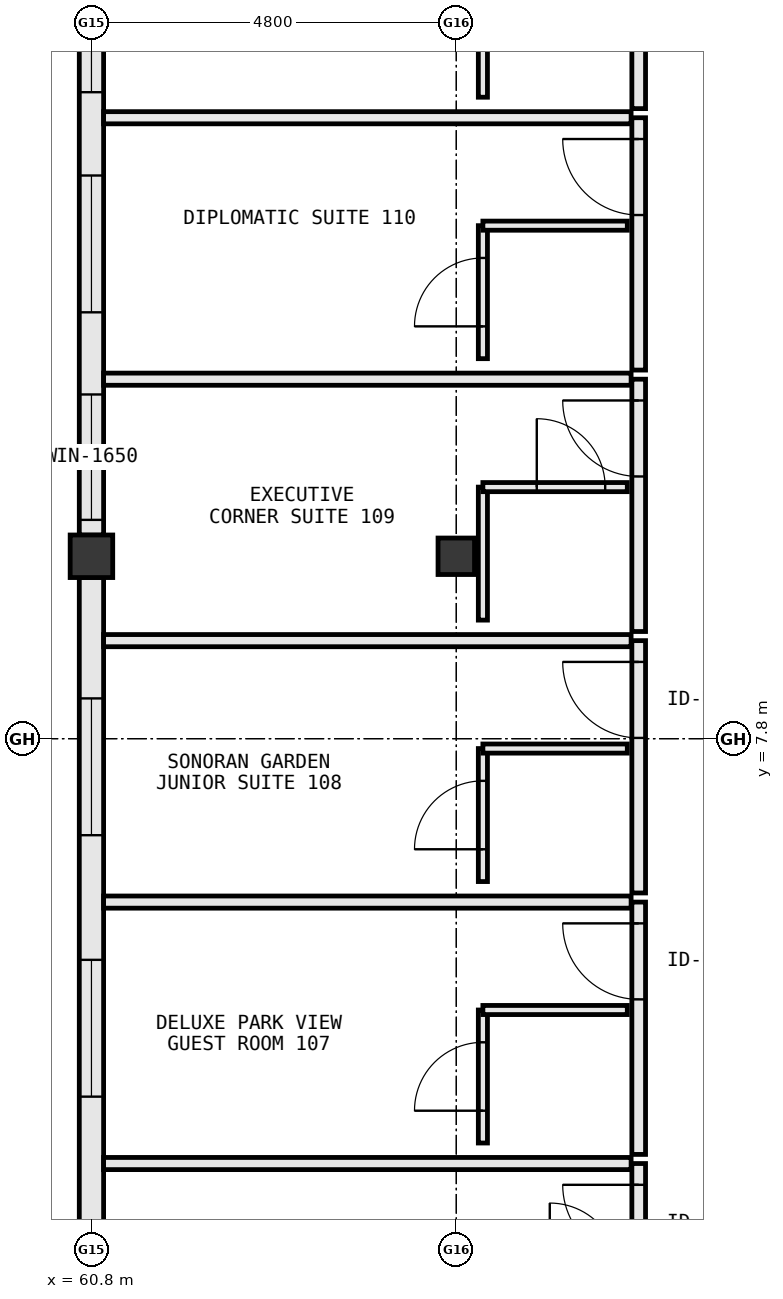
"""IFC4 building model, lengths in metres.
Left out: names, types, materials, properties, quantities, classifications, styles, units other than length and angle.
Written with IfcOpenShell. Run it as: python <this file> out.ifc"""

import sys

from ifc_helpers import new_model, si_unit, direction, frame, frame_2d, origin, origin_2d, place, context, subcontext, project, spatial, rectangle, extrude, element, fill, save


model = new_model("IFC4")
c1 = context("Model", 3, precision=1e-05, world=origin(), true_north=direction((0.0, 1.0)))
c2 = subcontext(c1, "Body", "Model", "MODEL_VIEW")
j1 = project(units=[si_unit("LENGTHUNIT", "METRE"), si_unit("PLANEANGLEUNIT", "RADIAN")], contexts=[c1])
p1 = place(None, origin())
s1 = spatial("IfcSite", under=j1, at=p1, CompositionType="ELEMENT")
p2 = place(p1, origin())
s2 = spatial("IfcBuilding", under=s1, at=p2, CompositionType="ELEMENT")
p3 = place(p2, frame((0.0, 0.0, 20.0)))
s3 = spatial("IfcBuildingStorey", under=s2, at=p3, CompositionType="ELEMENT", Elevation=20.0)
p4 = place(p3, frame((60.8, 10.2, 0.0), z_axis=(0.0, 0.0, 1.0), x_axis=(1.0, 0.0, 0.0)))
e1 = element("IfcColumn", 1, at=p4, inside=s3, PredefinedType="COLUMN", context=c2, shape_type="SweptSolid", body=[
    extrude(rectangle(XDim=0.56, YDim=0.56, at=origin_2d()), origin(), (0.0, 0.0, 1.0), 3.8),
])
p5 = place(p3, frame((65.6, 10.2, 0.0), z_axis=(0.0, 0.0, 1.0), x_axis=(1.0, 0.0, 0.0)))
e2 = element("IfcColumn", 2, at=p5, inside=s3, PredefinedType="COLUMN", context=c2, shape_type="SweptSolid", body=[
    extrude(rectangle(XDim=0.48, YDim=0.48, at=origin_2d()), origin(), (0.0, 0.0, 1.0), 3.8),
])
p6 = place(p3, frame((60.8, 18.322, 0.0), z_axis=(0.0, 0.0, 1.0), x_axis=(0.0, -1.0, 0.0)))
e3 = element("IfcWall", 3, at=p6, inside=s3, PredefinedType="STANDARD", context=c2, shape_type="SweptSolid", body=[
    extrude(rectangle(XDim=7.844, YDim=0.32, at=frame_2d((3.922, 0.0))), origin(), (0.0, 0.0, 1.0), 3.005),
])
p7 = place(p6, frame((5.993, 0.0, 0.85)))
e4 = element("IfcOpeningElement", 4, at=p7, cuts=e3, PredefinedType="OPENING", context=c2, shape_type="SweptSolid", body=[
    extrude(rectangle(XDim=1.65, YDim=1.8, at=frame_2d((0.825, 0.9))), frame((0.0, 0.172, 0.0), z_axis=(0.0, -1.0, 0.0), x_axis=(1.0, 0.0, 0.0)), (0.0, 0.0, 1.0), 0.344),
])
p8 = place(p6, frame((3.112, 0.0, 0.85)))
e5 = element("IfcOpeningElement", 5, at=p8, cuts=e3, PredefinedType="OPENING", context=c2, shape_type="SweptSolid", body=[
    extrude(rectangle(XDim=1.8, YDim=1.85, at=frame_2d((0.9, 0.925))), frame((0.0, 0.172, 0.0), z_axis=(0.0, -1.0, 0.0), x_axis=(1.0, 0.0, 0.0)), (0.0, 0.0, 1.0), 0.344),
])
p9 = place(p6, frame((0.216, 0.0, 0.85)))
e6 = element("IfcOpeningElement", 6, at=p9, cuts=e3, PredefinedType="OPENING", context=c2, shape_type="SweptSolid", body=[
    extrude(rectangle(XDim=1.8, YDim=1.85, at=frame_2d((0.9, 0.925))), frame((0.0, 0.172, 0.0), z_axis=(0.0, -1.0, 0.0), x_axis=(1.0, 0.0, 0.0)), (0.0, 0.0, 1.0), 0.344),
])
p10 = place(p3, frame((60.8, 9.922, 0.0), z_axis=(0.0, 0.0, 1.0), x_axis=(0.0, -1.0, 0.0)))
e7 = element("IfcWall", 7, at=p10, inside=s3, PredefinedType="STANDARD", context=c2, shape_type="SweptSolid", body=[
    extrude(rectangle(XDim=9.044, YDim=0.32, at=frame_2d((4.522, 0.0))), origin(), (0.0, 0.0, 1.0), 2.905),
])
p11 = place(p10, frame((5.032, 0.0, 0.85)))
e8 = element("IfcOpeningElement", 8, at=p11, cuts=e7, PredefinedType="OPENING", context=c2, shape_type="SweptSolid", body=[
    extrude(rectangle(XDim=1.8, YDim=1.85, at=frame_2d((0.9, 0.925))), frame((0.0, 0.172, 0.0), z_axis=(0.0, -1.0, 0.0), x_axis=(1.0, 0.0, 0.0)), (0.0, 0.0, 1.0), 0.344),
])
p12 = place(p10, frame((1.592, 0.0, 0.85)))
e9 = element("IfcOpeningElement", 9, at=p12, cuts=e7, PredefinedType="OPENING", context=c2, shape_type="SweptSolid", body=[
    extrude(rectangle(XDim=1.8, YDim=1.85, at=frame_2d((0.9, 0.925))), frame((0.0, 0.172, 0.0), z_axis=(0.0, -1.0, 0.0), x_axis=(1.0, 0.0, 0.0)), (0.0, 0.0, 1.0), 0.344),
])
p13 = place(p3, frame((68.0, -1.11, 0.0), z_axis=(0.0, 0.0, 1.0), x_axis=(0.0, 1.0, 0.0)))
e10 = element("IfcWall", 10, at=p13, inside=s3, PredefinedType="PARTITIONING", context=c2, shape_type="SweptSolid", body=[
    extrude(rectangle(XDim=3.32, YDim=0.18, at=frame_2d((1.66, 0.0))), origin(), (0.0, 0.0, 1.0), 3.55),
])
p14 = place(p13, frame((2.04, 0.0, 0.0)))
e11 = element("IfcOpeningElement", 11, at=p14, cuts=e10, PredefinedType="OPENING", context=c2, shape_type="SweptSolid", body=[
    extrude(rectangle(XDim=1.0, YDim=2.2, at=frame_2d((0.5, 1.1))), frame((0.0, 0.102, 0.0), z_axis=(0.0, -1.0, 0.0), x_axis=(1.0, 0.0, 0.0)), (0.0, 0.0, 1.0), 0.204),
])
p15 = place(p3, frame((60.96, 2.21, 0.0), z_axis=(0.0, 0.0, 1.0), x_axis=(1.0, 0.0, 0.0)))
e12 = element("IfcWall", 12, at=p15, inside=s3, PredefinedType="PARTITIONING", context=c2, shape_type="SweptSolid", body=[
    extrude(rectangle(XDim=6.94, YDim=0.16, at=frame_2d((3.47, 0.0))), origin(), (0.0, 0.0, 1.0), 3.55),
])
p16 = place(p3, frame((68.0, 2.33, 0.0), z_axis=(0.0, 0.0, 1.0), x_axis=(0.0, 1.0, 0.0)))
e13 = element("IfcWall", 13, at=p16, inside=s3, PredefinedType="PARTITIONING", context=c2, shape_type="SweptSolid", body=[
    extrude(rectangle(XDim=3.32, YDim=0.18, at=frame_2d((1.66, 0.0))), origin(), (0.0, 0.0, 1.0), 3.55),
])
p17 = place(p16, frame((2.04, 0.0, 0.0)))
e14 = element("IfcOpeningElement", 14, at=p17, cuts=e13, PredefinedType="OPENING", context=c2, shape_type="SweptSolid", body=[
    extrude(rectangle(XDim=1.0, YDim=2.2, at=frame_2d((0.5, 1.1))), frame((0.0, 0.102, 0.0), z_axis=(0.0, -1.0, 0.0), x_axis=(1.0, 0.0, 0.0)), (0.0, 0.0, 1.0), 0.204),
])
p18 = place(p3, frame((60.96, 5.65, 0.0), z_axis=(0.0, 0.0, 1.0), x_axis=(1.0, 0.0, 0.0)))
e15 = element("IfcWall", 15, at=p18, inside=s3, PredefinedType="PARTITIONING", context=c2, shape_type="SweptSolid", body=[
    extrude(rectangle(XDim=6.94, YDim=0.16, at=frame_2d((3.47, 0.0))), origin(), (0.0, 0.0, 1.0), 3.55),
])
p19 = place(p3, frame((65.95, 2.48, 0.0), z_axis=(0.0, 0.0, 1.0), x_axis=(0.0, 1.0, 0.0)))
e16 = element("IfcWall", 16, at=p19, inside=s3, PredefinedType="PARTITIONING", context=c2, shape_type="SweptSolid", body=[
    extrude(rectangle(XDim=1.75, YDim=0.12, at=frame_2d((0.875, 0.0))), origin(), (0.0, 0.0, 1.0), 2.905),
])
p20 = place(p19, frame((0.425, 0.0, 0.0)))
e17 = element("IfcOpeningElement", 17, at=p20, cuts=e16, PredefinedType="OPENING", context=c2, shape_type="SweptSolid", body=[
    extrude(rectangle(XDim=0.9, YDim=2.15, at=frame_2d((0.45, 1.075))), frame((0.0, 0.072, 0.0), z_axis=(0.0, -1.0, 0.0), x_axis=(1.0, 0.0, 0.0)), (0.0, 0.0, 1.0), 0.144),
])
p21 = place(p3, frame((65.95, 4.23, 0.0), z_axis=(0.0, 0.0, 1.0), x_axis=(1.0, 0.0, 0.0)))
e18 = element("IfcWall", 18, at=p21, inside=s3, PredefinedType="PARTITIONING", context=c2, shape_type="SweptSolid", body=[
    extrude(rectangle(XDim=1.9, YDim=0.12, at=frame_2d((0.95, 0.0))), origin(), (0.0, 0.0, 1.0), 3.55),
])
p22 = place(p3, frame((68.0, 5.77, 0.0), z_axis=(0.0, 0.0, 1.0), x_axis=(0.0, 1.0, 0.0)))
e19 = element("IfcWall", 19, at=p22, inside=s3, PredefinedType="PARTITIONING", context=c2, shape_type="SweptSolid", body=[
    extrude(rectangle(XDim=3.32, YDim=0.18, at=frame_2d((1.66, 0.0))), origin(), (0.0, 0.0, 1.0), 3.55),
])
p23 = place(p22, frame((2.04, 0.0, 0.0)))
e20 = element("IfcOpeningElement", 20, at=p23, cuts=e19, PredefinedType="OPENING", context=c2, shape_type="SweptSolid", body=[
    extrude(rectangle(XDim=1.0, YDim=2.2, at=frame_2d((0.5, 1.1))), frame((0.0, 0.102, 0.0), z_axis=(0.0, -1.0, 0.0), x_axis=(1.0, 0.0, 0.0)), (0.0, 0.0, 1.0), 0.204),
])
p24 = place(p3, frame((60.96, 9.09, 0.0), z_axis=(0.0, 0.0, 1.0), x_axis=(1.0, 0.0, 0.0)))
e21 = element("IfcWall", 21, at=p24, inside=s3, PredefinedType="PARTITIONING", context=c2, shape_type="SweptSolid", body=[
    extrude(rectangle(XDim=6.94, YDim=0.16, at=frame_2d((3.47, 0.0))), origin(), (0.0, 0.0, 1.0), 3.55),
])
p25 = place(p3, frame((65.95, 5.92, 0.0), z_axis=(0.0, 0.0, 1.0), x_axis=(0.0, 1.0, 0.0)))
e22 = element("IfcWall", 22, at=p25, inside=s3, PredefinedType="PARTITIONING", context=c2, shape_type="SweptSolid", body=[
    extrude(rectangle(XDim=1.75, YDim=0.12, at=frame_2d((0.875, 0.0))), origin(), (0.0, 0.0, 1.0), 2.905),
])
p26 = place(p25, frame((0.425, 0.0, 0.0)))
e23 = element("IfcOpeningElement", 23, at=p26, cuts=e22, PredefinedType="OPENING", context=c2, shape_type="SweptSolid", body=[
    extrude(rectangle(XDim=0.9, YDim=2.15, at=frame_2d((0.45, 1.075))), frame((0.0, 0.072, 0.0), z_axis=(0.0, -1.0, 0.0), x_axis=(1.0, 0.0, 0.0)), (0.0, 0.0, 1.0), 0.144),
])
p27 = place(p3, frame((65.95, 7.67, 0.0), z_axis=(0.0, 0.0, 1.0), x_axis=(1.0, 0.0, 0.0)))
e24 = element("IfcWall", 24, at=p27, inside=s3, PredefinedType="PARTITIONING", context=c2, shape_type="SweptSolid", body=[
    extrude(rectangle(XDim=1.9, YDim=0.12, at=frame_2d((0.95, 0.0))), origin(), (0.0, 0.0, 1.0), 3.55),
])
p28 = place(p3, frame((68.0, 9.21, 0.0), z_axis=(0.0, 0.0, 1.0), x_axis=(0.0, 1.0, 0.0)))
e25 = element("IfcWall", 25, at=p28, inside=s3, PredefinedType="PARTITIONING", context=c2, shape_type="SweptSolid", body=[
    extrude(rectangle(XDim=3.32, YDim=0.18, at=frame_2d((1.66, 0.0))), origin(), (0.0, 0.0, 1.0), 3.55),
])
p29 = place(p28, frame((2.04, 0.0, 0.0)))
e26 = element("IfcOpeningElement", 26, at=p29, cuts=e25, PredefinedType="OPENING", context=c2, shape_type="SweptSolid", body=[
    extrude(rectangle(XDim=1.0, YDim=2.2, at=frame_2d((0.5, 1.1))), frame((0.0, 0.102, 0.0), z_axis=(0.0, -1.0, 0.0), x_axis=(1.0, 0.0, 0.0)), (0.0, 0.0, 1.0), 0.204),
])
p30 = place(p3, frame((60.96, 12.53, 0.0), z_axis=(0.0, 0.0, 1.0), x_axis=(1.0, 0.0, 0.0)))
e27 = element("IfcWall", 27, at=p30, inside=s3, PredefinedType="PARTITIONING", context=c2, shape_type="SweptSolid", body=[
    extrude(rectangle(XDim=6.94, YDim=0.16, at=frame_2d((3.47, 0.0))), origin(), (0.0, 0.0, 1.0), 3.55),
])
p31 = place(p3, frame((65.95, 9.36, 0.0), z_axis=(0.0, 0.0, 1.0), x_axis=(0.0, 1.0, 0.0)))
e28 = element("IfcWall", 28, at=p31, inside=s3, PredefinedType="PARTITIONING", context=c2, shape_type="SweptSolid", body=[
    extrude(rectangle(XDim=1.75, YDim=0.12, at=frame_2d((0.875, 0.0))), origin(), (0.0, 0.0, 1.0), 2.905),
])
p32 = place(p3, frame((65.95, 11.11, 0.0), z_axis=(0.0, 0.0, 1.0), x_axis=(1.0, 0.0, 0.0)))
e29 = element("IfcWall", 29, at=p32, inside=s3, PredefinedType="PARTITIONING", context=c2, shape_type="SweptSolid", body=[
    extrude(rectangle(XDim=1.9, YDim=0.12, at=frame_2d((0.95, 0.0))), origin(), (0.0, 0.0, 1.0), 3.55),
])
p33 = place(p32, frame((0.709, 0.0, 0.0)))
e30 = element("IfcOpeningElement", 30, at=p33, cuts=e29, PredefinedType="OPENING", context=c2, shape_type="SweptSolid", body=[
    extrude(rectangle(XDim=0.9, YDim=2.15, at=frame_2d((0.45, 1.075))), frame((0.0, 0.072, 0.0), z_axis=(0.0, -1.0, 0.0), x_axis=(1.0, 0.0, 0.0)), (0.0, 0.0, 1.0), 0.144),
])
p34 = place(p3, frame((68.0, 12.65, 0.0), z_axis=(0.0, 0.0, 1.0), x_axis=(0.0, 1.0, 0.0)))
e31 = element("IfcWall", 31, at=p34, inside=s3, PredefinedType="PARTITIONING", context=c2, shape_type="SweptSolid", body=[
    extrude(rectangle(XDim=3.32, YDim=0.18, at=frame_2d((1.66, 0.0))), origin(), (0.0, 0.0, 1.0), 3.55),
])
p35 = place(p34, frame((2.04, 0.0, 0.0)))
e32 = element("IfcOpeningElement", 32, at=p35, cuts=e31, PredefinedType="OPENING", context=c2, shape_type="SweptSolid", body=[
    extrude(rectangle(XDim=1.0, YDim=2.2, at=frame_2d((0.5, 1.1))), frame((0.0, 0.102, 0.0), z_axis=(0.0, -1.0, 0.0), x_axis=(1.0, 0.0, 0.0)), (0.0, 0.0, 1.0), 0.204),
])
p36 = place(p3, frame((60.96, 15.97, 0.0), z_axis=(0.0, 0.0, 1.0), x_axis=(1.0, 0.0, 0.0)))
e33 = element("IfcWall", 33, at=p36, inside=s3, PredefinedType="PARTITIONING", context=c2, shape_type="SweptSolid", body=[
    extrude(rectangle(XDim=6.94, YDim=0.16, at=frame_2d((3.47, 0.0))), origin(), (0.0, 0.0, 1.0), 3.55),
])
p37 = place(p3, frame((65.95, 12.8, 0.0), z_axis=(0.0, 0.0, 1.0), x_axis=(0.0, 1.0, 0.0)))
e34 = element("IfcWall", 34, at=p37, inside=s3, PredefinedType="PARTITIONING", context=c2, shape_type="SweptSolid", body=[
    extrude(rectangle(XDim=1.75, YDim=0.12, at=frame_2d((0.875, 0.0))), origin(), (0.0, 0.0, 1.0), 3.005),
])
p38 = place(p37, frame((0.425, 0.0, 0.0)))
e35 = element("IfcOpeningElement", 35, at=p38, cuts=e34, PredefinedType="OPENING", context=c2, shape_type="SweptSolid", body=[
    extrude(rectangle(XDim=0.9, YDim=2.15, at=frame_2d((0.45, 1.075))), frame((0.0, 0.072, 0.0), z_axis=(0.0, -1.0, 0.0), x_axis=(1.0, 0.0, 0.0)), (0.0, 0.0, 1.0), 0.144),
])
p39 = place(p3, frame((65.95, 14.55, 0.0), z_axis=(0.0, 0.0, 1.0), x_axis=(1.0, 0.0, 0.0)))
e36 = element("IfcWall", 36, at=p39, inside=s3, PredefinedType="PARTITIONING", context=c2, shape_type="SweptSolid", body=[
    extrude(rectangle(XDim=1.9, YDim=0.12, at=frame_2d((0.95, 0.0))), origin(), (0.0, 0.0, 1.0), 3.55),
])
p40 = place(p3, frame((68.0, 16.09, 0.0), z_axis=(0.0, 0.0, 1.0), x_axis=(0.0, 1.0, 0.0)))
e37 = element("IfcWall", 37, at=p40, inside=s3, PredefinedType="PARTITIONING", context=c2, shape_type="SweptSolid", body=[
    extrude(rectangle(XDim=3.32, YDim=0.18, at=frame_2d((1.66, 0.0))), origin(), (0.0, 0.0, 1.0), 3.55),
])
p41 = place(p40, frame((2.04, 0.0, 0.0)))
e38 = element("IfcOpeningElement", 38, at=p41, cuts=e37, PredefinedType="OPENING", context=c2, shape_type="SweptSolid", body=[
    extrude(rectangle(XDim=1.0, YDim=2.2, at=frame_2d((0.5, 1.1))), frame((0.0, 0.102, 0.0), z_axis=(0.0, -1.0, 0.0), x_axis=(1.0, 0.0, 0.0)), (0.0, 0.0, 1.0), 0.204),
])
p42 = place(p3, frame((65.95, 16.24, 0.0), z_axis=(0.0, 0.0, 1.0), x_axis=(0.0, 1.0, 0.0)))
e39 = element("IfcWall", 39, at=p42, inside=s3, PredefinedType="PARTITIONING", context=c2, shape_type="SweptSolid", body=[
    extrude(rectangle(XDim=1.75, YDim=0.12, at=frame_2d((0.875, 0.0))), origin(), (0.0, 0.0, 1.0), 3.005),
])
p43 = place(p11, origin())
e40 = element("IfcWindow", 40, at=p43, inside=s3, PartitioningType="SINGLE_PANEL", PredefinedType="WINDOW", context=c2, shape_type="SweptSolid", body=[
    extrude(rectangle(XDim=1.8, YDim=1.85, at=frame_2d((0.9, 0.925))), frame((0.0, 0.03, 0.0), z_axis=(0.0, -1.0, 0.0), x_axis=(1.0, 0.0, 0.0)), (0.0, 0.0, 1.0), 0.06),
])
fill(e8, e40)
p44 = place(p12, origin())
e41 = element("IfcWindow", 41, at=p44, inside=s3, PartitioningType="SINGLE_PANEL", PredefinedType="WINDOW", context=c2, shape_type="SweptSolid", body=[
    extrude(rectangle(XDim=1.8, YDim=1.85, at=frame_2d((0.9, 0.925))), frame((0.0, 0.03, 0.0), z_axis=(0.0, -1.0, 0.0), x_axis=(1.0, 0.0, 0.0)), (0.0, 0.0, 1.0), 0.06),
])
fill(e9, e41)
p45 = place(p7, origin())
e42 = element("IfcWindow", 42, at=p45, inside=s3, PartitioningType="SINGLE_PANEL", PredefinedType="WINDOW", context=c2, shape_type="SweptSolid", body=[
    extrude(rectangle(XDim=1.65, YDim=1.8, at=frame_2d((0.825, 0.9))), frame((0.0, 0.03, 0.0), z_axis=(0.0, -1.0, 0.0), x_axis=(1.0, 0.0, 0.0)), (0.0, 0.0, 1.0), 0.06),
])
fill(e4, e42)
p46 = place(p8, origin())
e43 = element("IfcWindow", 43, at=p46, inside=s3, PartitioningType="SINGLE_PANEL", PredefinedType="WINDOW", context=c2, shape_type="SweptSolid", body=[
    extrude(rectangle(XDim=1.8, YDim=1.85, at=frame_2d((0.9, 0.925))), frame((0.0, 0.03, 0.0), z_axis=(0.0, -1.0, 0.0), x_axis=(1.0, 0.0, 0.0)), (0.0, 0.0, 1.0), 0.06),
])
fill(e5, e43)
p47 = place(p9, origin())
e44 = element("IfcWindow", 44, at=p47, inside=s3, PartitioningType="SINGLE_PANEL", PredefinedType="WINDOW", context=c2, shape_type="SweptSolid", body=[
    extrude(rectangle(XDim=1.8, YDim=1.85, at=frame_2d((0.9, 0.925))), frame((0.0, 0.03, 0.0), z_axis=(0.0, -1.0, 0.0), x_axis=(1.0, 0.0, 0.0)), (0.0, 0.0, 1.0), 0.06),
])
fill(e6, e44)
p48 = place(p14, origin())
e45 = element("IfcDoor", 45, at=p48, inside=s3, OperationType="SINGLE_SWING_RIGHT", PredefinedType="DOOR", context=c2, shape_type="SweptSolid", body=[
    extrude(rectangle(XDim=1.0, YDim=2.2, at=frame_2d((0.5, 1.1))), frame((0.0, 0.025, 0.0), z_axis=(0.0, -1.0, 0.0), x_axis=(1.0, 0.0, 0.0)), (0.0, 0.0, 1.0), 0.05),
])
fill(e11, e45)
p49 = place(p17, origin())
e46 = element("IfcDoor", 46, at=p49, inside=s3, OperationType="SINGLE_SWING_RIGHT", PredefinedType="DOOR", context=c2, shape_type="SweptSolid", body=[
    extrude(rectangle(XDim=1.0, YDim=2.2, at=frame_2d((0.5, 1.1))), frame((0.0, 0.025, 0.0), z_axis=(0.0, -1.0, 0.0), x_axis=(1.0, 0.0, 0.0)), (0.0, 0.0, 1.0), 0.05),
])
fill(e14, e46)
p50 = place(p20, origin())
e47 = element("IfcDoor", 47, at=p50, inside=s3, OperationType="SINGLE_SWING_LEFT", PredefinedType="DOOR", context=c2, shape_type="SweptSolid", body=[
    extrude(rectangle(XDim=0.9, YDim=2.15, at=frame_2d((0.45, 1.075))), frame((0.0, 0.025, 0.0), z_axis=(0.0, -1.0, 0.0), x_axis=(1.0, 0.0, 0.0)), (0.0, 0.0, 1.0), 0.05),
])
fill(e17, e47)
p51 = place(p23, origin())
e48 = element("IfcDoor", 48, at=p51, inside=s3, OperationType="SINGLE_SWING_RIGHT", PredefinedType="DOOR", context=c2, shape_type="SweptSolid", body=[
    extrude(rectangle(XDim=1.0, YDim=2.2, at=frame_2d((0.5, 1.1))), frame((0.0, 0.025, 0.0), z_axis=(0.0, -1.0, 0.0), x_axis=(1.0, 0.0, 0.0)), (0.0, 0.0, 1.0), 0.05),
])
fill(e20, e48)
p52 = place(p26, origin())
e49 = element("IfcDoor", 49, at=p52, inside=s3, OperationType="SINGLE_SWING_LEFT", PredefinedType="DOOR", context=c2, shape_type="SweptSolid", body=[
    extrude(rectangle(XDim=0.9, YDim=2.15, at=frame_2d((0.45, 1.075))), frame((0.0, 0.025, 0.0), z_axis=(0.0, -1.0, 0.0), x_axis=(1.0, 0.0, 0.0)), (0.0, 0.0, 1.0), 0.05),
])
fill(e23, e49)
p53 = place(p29, origin())
e50 = element("IfcDoor", 50, at=p53, inside=s3, OperationType="SINGLE_SWING_RIGHT", PredefinedType="DOOR", context=c2, shape_type="SweptSolid", body=[
    extrude(rectangle(XDim=1.0, YDim=2.2, at=frame_2d((0.5, 1.1))), frame((0.0, 0.025, 0.0), z_axis=(0.0, -1.0, 0.0), x_axis=(1.0, 0.0, 0.0)), (0.0, 0.0, 1.0), 0.05),
])
fill(e26, e50)
p54 = place(p33, origin())
e51 = element("IfcDoor", 51, at=p54, inside=s3, OperationType="SINGLE_SWING_LEFT", PredefinedType="DOOR", context=c2, shape_type="SweptSolid", body=[
    extrude(rectangle(XDim=0.9, YDim=2.15, at=frame_2d((0.45, 1.075))), frame((0.0, 0.025, 0.0), z_axis=(0.0, -1.0, 0.0), x_axis=(1.0, 0.0, 0.0)), (0.0, 0.0, 1.0), 0.05),
])
fill(e30, e51)
p55 = place(p35, origin())
e52 = element("IfcDoor", 52, at=p55, inside=s3, OperationType="SINGLE_SWING_RIGHT", PredefinedType="DOOR", context=c2, shape_type="SweptSolid", body=[
    extrude(rectangle(XDim=1.0, YDim=2.2, at=frame_2d((0.5, 1.1))), frame((0.0, 0.025, 0.0), z_axis=(0.0, -1.0, 0.0), x_axis=(1.0, 0.0, 0.0)), (0.0, 0.0, 1.0), 0.05),
])
fill(e32, e52)
p56 = place(p38, origin())
e53 = element("IfcDoor", 53, at=p56, inside=s3, OperationType="SINGLE_SWING_LEFT", PredefinedType="DOOR", context=c2, shape_type="SweptSolid", body=[
    extrude(rectangle(XDim=0.9, YDim=2.15, at=frame_2d((0.45, 1.075))), frame((0.0, 0.025, 0.0), z_axis=(0.0, -1.0, 0.0), x_axis=(1.0, 0.0, 0.0)), (0.0, 0.0, 1.0), 0.05),
])
fill(e35, e53)
save(model, sys.argv[1])
